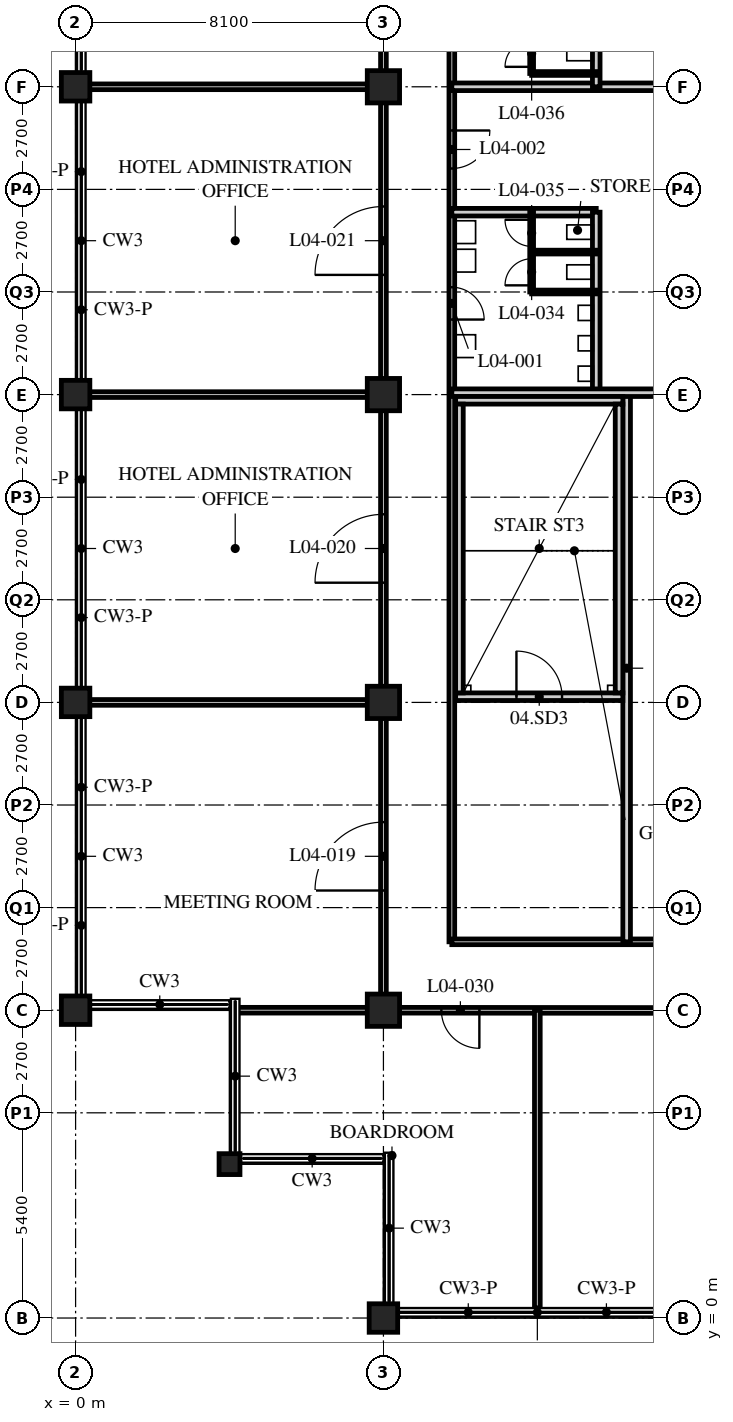
"""IFC4 building model, lengths in metres.
Left out: names, types, materials, properties, quantities, classifications, styles, units other than length and angle.
Written with IfcOpenShell. Run it as: python <this file> out.ifc"""

import sys

from ifc_helpers import new_model, si_unit, direction, frame, frame_2d, origin, origin_2d, place, context, subcontext, project, spatial, rectangle, hollow_rectangle, extrude, element, fill, save


model = new_model("IFC4")
c1 = context("Model", 3, precision=1e-05, world=origin(), true_north=direction((0.0, 1.0)))
c2 = subcontext(c1, "Body", "Model", "MODEL_VIEW")
j1 = project(units=[si_unit("LENGTHUNIT", "METRE"), si_unit("PLANEANGLEUNIT", "RADIAN")], contexts=[c1])
p1 = place(None, origin())
s1 = spatial("IfcSite", under=j1, at=p1, CompositionType="ELEMENT")
p2 = place(p1, origin())
s2 = spatial("IfcBuilding", under=s1, at=p2, CompositionType="ELEMENT")
p3 = place(p2, frame((0.0, 0.0, 22.2)))
s3 = spatial("IfcBuildingStorey", under=s2, at=p3, CompositionType="ELEMENT", Elevation=22.2)
for number, where, z_axis, x_axis in (
    (1, (0.0, 8.1, 0.0), (0.0, 0.0, 1.0), (1.0, 0.0, 0.0)),
    (2, (0.0, 16.2, 0.0), (0.0, 0.0, 1.0), (1.0, 0.0, 0.0)),
    (3, (0.0, 24.3, 0.0), (0.0, 0.0, 1.0), (1.0, 0.0, 0.0)),
    (4, (0.0, 32.4, 0.0), (0.0, 0.0, 1.0), (1.0, 0.0, 0.0)),
):
    element("IfcColumn", number, at=place(p3, frame(where, z_axis=z_axis, x_axis=x_axis)), inside=s3, PredefinedType="COLUMN", context=c2, shape_type="SweptSolid", body=[
        extrude(hollow_rectangle(XDim=0.75, YDim=0.75, WallThickness=0.07, at=origin_2d()), origin(), (0.0, 0.0, 1.0), 5.4),
    ])
p4 = place(p3, frame((4.05, 4.05, 0.0), z_axis=(0.0, 0.0, 1.0), x_axis=(1.0, 0.0, 0.0)))
e5 = element("IfcColumn", 5, at=p4, inside=s3, PredefinedType="COLUMN", context=c2, shape_type="SweptSolid", body=[
    extrude(hollow_rectangle(XDim=0.55, YDim=0.55, WallThickness=0.05, at=origin_2d()), origin(), (0.0, 0.0, 1.0), 5.4),
])
p5 = place(p3, frame((8.1, 0.0, 0.0), z_axis=(0.0, 0.0, 1.0), x_axis=(1.0, 0.0, 0.0)))
e6 = element("IfcColumn", 6, at=p5, inside=s3, PredefinedType="COLUMN", context=c2, shape_type="SweptSolid", body=[
    extrude(hollow_rectangle(XDim=0.75, YDim=0.75, WallThickness=0.07, at=origin_2d()), origin(), (0.0, 0.0, 1.0), 5.4),
])
for number, where, z_axis, x_axis in (
    (7, (8.1, 8.1, 0.0), (0.0, 0.0, 1.0), (1.0, 0.0, 0.0)),
    (8, (8.1, 16.2, 0.0), (0.0, 0.0, 1.0), (1.0, 0.0, 0.0)),
    (9, (8.1, 24.3, 0.0), (0.0, 0.0, 1.0), (1.0, 0.0, 0.0)),
    (10, (8.1, 32.4, 0.0), (0.0, 0.0, 1.0), (1.0, 0.0, 0.0)),
):
    element("IfcColumn", number, at=place(p3, frame(where, z_axis=z_axis, x_axis=x_axis)), inside=s3, PredefinedType="COLUMN", context=c2, shape_type="SweptSolid", body=[
        extrude(hollow_rectangle(XDim=0.85, YDim=0.85, WallThickness=0.085, at=origin_2d()), origin(), (0.0, 0.0, 1.0), 5.4),
    ])
p6 = place(p3, frame((8.1, 8.1, 0.0), z_axis=(0.0, 0.0, 1.0), x_axis=(0.99999962324, -0.000868055229, 0.0)))
e11 = element("IfcWall", 11, at=p6, inside=s3, PredefinedType="PARTITIONING", context=c2, shape_type="SweptSolid", body=[
    extrude(rectangle(XDim=40.5, YDim=0.15, at=frame_2d((20.25, 0.0))), origin(), (0.0, 0.0, 1.0), 4.428),
])
p7 = place(p6, frame((11.25, 0.0, 0.0)))
e12 = element("IfcOpeningElement", 12, at=p7, cuts=e11, PredefinedType="OPENING", context=c2, shape_type="SweptSolid", body=[
    extrude(rectangle(XDim=1.8, YDim=2.4, at=frame_2d((0.9, 1.2))), frame((0.0, 0.085, 0.0), z_axis=(0.0, -1.0, 0.0), x_axis=(1.0, 0.0, 0.0)), (0.0, 0.0, 1.0), 0.17),
])
p8 = place(p6, frame((25.15, 0.0, 0.0)))
e13 = element("IfcOpeningElement", 13, at=p8, cuts=e11, PredefinedType="OPENING", context=c2, shape_type="SweptSolid", body=[
    extrude(rectangle(XDim=1.8, YDim=2.4, at=frame_2d((0.9, 1.2))), frame((0.0, 0.085, 0.0), z_axis=(0.0, -1.0, 0.0), x_axis=(1.0, 0.0, 0.0)), (0.0, 0.0, 1.0), 0.17),
])
p9 = place(p6, frame((33.25, 0.0, 0.0)))
e14 = element("IfcOpeningElement", 14, at=p9, cuts=e11, PredefinedType="OPENING", context=c2, shape_type="SweptSolid", body=[
    extrude(rectangle(XDim=1.8, YDim=2.4, at=frame_2d((0.9, 1.2))), frame((0.0, 0.085, 0.0), z_axis=(0.0, -1.0, 0.0), x_axis=(1.0, 0.0, 0.0)), (0.0, 0.0, 1.0), 0.17),
])
p10 = place(p6, frame((1.525, 0.0, 0.0)))
e15 = element("IfcOpeningElement", 15, at=p10, cuts=e11, PredefinedType="OPENING", context=c2, shape_type="SweptSolid", body=[
    extrude(rectangle(XDim=1.0, YDim=2.1, at=frame_2d((0.5, 1.05))), frame((0.0, 0.085, 0.0), z_axis=(0.0, -1.0, 0.0), x_axis=(1.0, 0.0, 0.0)), (0.0, 0.0, 1.0), 0.17),
])
p11 = place(p6, frame((37.975, 0.0, 0.0)))
e16 = element("IfcOpeningElement", 16, at=p11, cuts=e11, PredefinedType="OPENING", context=c2, shape_type="SweptSolid", body=[
    extrude(rectangle(XDim=1.0, YDim=2.1, at=frame_2d((0.5, 1.05))), frame((0.0, 0.085, 0.0), z_axis=(0.0, -1.0, 0.0), x_axis=(1.0, 0.0, 0.0)), (0.0, 0.0, 1.0), 0.17),
])
p12 = place(p3, frame((8.1, 8.1, 0.0), z_axis=(0.0, 0.0, 1.0), x_axis=(0.0, 1.0, 0.0)))
e17 = element("IfcWall", 17, at=p12, inside=s3, PredefinedType="PARTITIONING", context=c2, shape_type="SweptSolid", body=[
    extrude(rectangle(XDim=34.35, YDim=0.15, at=frame_2d((17.175, 0.0))), origin(), (0.0, 0.0, 1.0), 4.428),
])
p13 = place(p12, frame((3.15, 0.0, 0.0)))
e18 = element("IfcOpeningElement", 18, at=p13, cuts=e17, PredefinedType="OPENING", context=c2, shape_type="SweptSolid", body=[
    extrude(rectangle(XDim=1.8, YDim=2.4, at=frame_2d((0.9, 1.2))), frame((0.0, 0.085, 0.0), z_axis=(0.0, -1.0, 0.0), x_axis=(1.0, 0.0, 0.0)), (0.0, 0.0, 1.0), 0.17),
])
p14 = place(p12, frame((11.25, 0.0, 0.0)))
e19 = element("IfcOpeningElement", 19, at=p14, cuts=e17, PredefinedType="OPENING", context=c2, shape_type="SweptSolid", body=[
    extrude(rectangle(XDim=1.8, YDim=2.4, at=frame_2d((0.9, 1.2))), frame((0.0, 0.085, 0.0), z_axis=(0.0, -1.0, 0.0), x_axis=(1.0, 0.0, 0.0)), (0.0, 0.0, 1.0), 0.17),
])
p15 = place(p12, frame((19.35, 0.0, 0.0)))
e20 = element("IfcOpeningElement", 20, at=p15, cuts=e17, PredefinedType="OPENING", context=c2, shape_type="SweptSolid", body=[
    extrude(rectangle(XDim=1.8, YDim=2.4, at=frame_2d((0.9, 1.2))), frame((0.0, 0.085, 0.0), z_axis=(0.0, -1.0, 0.0), x_axis=(1.0, 0.0, 0.0)), (0.0, 0.0, 1.0), 0.17),
])
p16 = place(p12, frame((28.425, 0.0, 0.0)))
e21 = element("IfcOpeningElement", 21, at=p16, cuts=e17, PredefinedType="OPENING", context=c2, shape_type="SweptSolid", body=[
    extrude(rectangle(XDim=1.8, YDim=2.4, at=frame_2d((0.9, 1.2))), frame((0.0, 0.085, 0.0), z_axis=(0.0, -1.0, 0.0), x_axis=(1.0, 0.0, 0.0)), (0.0, 0.0, 1.0), 0.17),
])
p17 = place(p3, frame((9.9, 40.65, 0.0), z_axis=(0.0, 0.0, 1.0), x_axis=(0.0, -1.0, 0.0)))
e22 = element("IfcWall", 22, at=p17, inside=s3, PredefinedType="PARTITIONING", context=c2, shape_type="SweptSolid", body=[
    extrude(rectangle(XDim=30.75, YDim=0.15, at=frame_2d((15.375, 0.0))), origin(), (0.0, 0.0, 1.0), 5.19),
])
p18 = place(p17, frame((13.525, 0.0, 0.0)))
e23 = element("IfcOpeningElement", 23, at=p18, cuts=e22, PredefinedType="OPENING", context=c2, shape_type="SweptSolid", body=[
    extrude(rectangle(XDim=0.85, YDim=2.1, at=frame_2d((0.425, 1.05))), frame((0.0, 0.085, 0.0), z_axis=(0.0, -1.0, 0.0), x_axis=(1.0, 0.0, 0.0)), (0.0, 0.0, 1.0), 0.17),
])
p19 = place(p17, frame((9.4, 0.0, 0.0)))
e24 = element("IfcOpeningElement", 24, at=p19, cuts=e22, PredefinedType="OPENING", context=c2, shape_type="SweptSolid", body=[
    extrude(rectangle(XDim=1.0, YDim=2.1, at=frame_2d((0.5, 1.05))), frame((0.0, 0.085, 0.0), z_axis=(0.0, -1.0, 0.0), x_axis=(1.0, 0.0, 0.0)), (0.0, 0.0, 1.0), 0.17),
])
p20 = place(p17, frame((5.025, 0.0, 0.0)))
e25 = element("IfcOpeningElement", 25, at=p20, cuts=e22, PredefinedType="OPENING", context=c2, shape_type="SweptSolid", body=[
    extrude(rectangle(XDim=0.85, YDim=2.1, at=frame_2d((0.425, 1.05))), frame((0.0, 0.085, 0.0), z_axis=(0.0, -1.0, 0.0), x_axis=(1.0, 0.0, 0.0)), (0.0, 0.0, 1.0), 0.17),
])
p21 = place(p17, frame((0.9, 0.0, 0.0)))
e26 = element("IfcOpeningElement", 26, at=p21, cuts=e22, PredefinedType="OPENING", context=c2, shape_type="SweptSolid", body=[
    extrude(rectangle(XDim=1.0, YDim=2.1, at=frame_2d((0.5, 1.05))), frame((0.0, 0.085, 0.0), z_axis=(0.0, -1.0, 0.0), x_axis=(1.0, 0.0, 0.0)), (0.0, 0.0, 1.0), 0.17),
])
p22 = place(p3, frame((9.9, 9.9, 0.0), z_axis=(0.0, 0.0, 1.0), x_axis=(1.0, 0.0, 0.0)))
e27 = element("IfcWall", 27, at=p22, inside=s3, PredefinedType="PARTITIONING", context=c2, shape_type="SweptSolid", body=[
    extrude(rectangle(XDim=17.24, YDim=0.15, at=frame_2d((8.62, 0.0))), origin(), (0.0, 0.0, 1.0), 5.19),
])
p23 = place(p22, frame((10.425, 0.0, 0.0)))
e28 = element("IfcOpeningElement", 28, at=p23, cuts=e27, PredefinedType="OPENING", context=c2, shape_type="SweptSolid", body=[
    extrude(rectangle(XDim=1.0, YDim=2.1, at=frame_2d((0.5, 1.05))), frame((0.0, 0.085, 0.0), z_axis=(0.0, -1.0, 0.0), x_axis=(1.0, 0.0, 0.0)), (0.0, 0.0, 1.0), 0.17),
])
p24 = place(p3, frame((9.9, 32.4, 0.0), z_axis=(0.0, 0.0, 1.0), x_axis=(1.0, 0.0, 0.0)))
e29 = element("IfcWall", 29, at=p24, inside=s3, PredefinedType="SOLIDWALL", context=c2, shape_type="SweptSolid", body=[
    extrude(rectangle(XDim=6.3, YDim=0.2, at=frame_2d((3.15, 0.0))), origin(), (0.0, 0.0, 1.0), 4.428),
])
p25 = place(p3, frame((9.9, 29.1, 0.0), z_axis=(0.0, 0.0, 1.0), x_axis=(1.0, 0.0, 0.0)))
e30 = element("IfcWall", 30, at=p25, inside=s3, PredefinedType="SOLIDWALL", context=c2, shape_type="SweptSolid", body=[
    extrude(rectangle(XDim=3.8, YDim=0.2, at=frame_2d((1.9, 0.0))), origin(), (0.0, 0.0, 1.0), 5.19),
])
p26 = place(p3, frame((13.7, 24.3, 0.0), z_axis=(0.0, 0.0, 1.0), x_axis=(0.0, 1.0, 0.0)))
e31 = element("IfcWall", 31, at=p26, inside=s3, PredefinedType="SOLIDWALL", context=c2, shape_type="SweptSolid", body=[
    extrude(rectangle(XDim=4.8, YDim=0.2, at=frame_2d((2.4, 0.0))), origin(), (0.0, 0.0, 1.0), 5.19),
])
p27 = place(p3, frame((13.7, 32.4, 0.0), z_axis=(0.0, 0.0, 1.0), x_axis=(0.0, 1.0, 0.0)))
e32 = element("IfcWall", 32, at=p27, inside=s3, PredefinedType="SOLIDWALL", context=c2, shape_type="SweptSolid", body=[
    extrude(rectangle(XDim=5.6, YDim=0.2, at=frame_2d((2.8, 0.0))), origin(), (0.0, 0.0, 1.0), 5.19),
])
p28 = place(p3, frame((14.5, 9.9, 0.0), z_axis=(0.0, 0.0, 1.0), x_axis=(0.0, 1.0, 0.0)))
e33 = element("IfcWall", 33, at=p28, inside=s3, PredefinedType="SOLIDWALL", context=c2, shape_type="SweptSolid", body=[
    extrude(rectangle(XDim=14.4, YDim=0.2, at=frame_2d((7.2, 0.0))), origin(), (0.0, 0.0, 1.0), 5.19),
])
p29 = place(p3, frame((9.9, 24.35, 0.0), z_axis=(0.0, 0.0, 1.0), x_axis=(1.0, 0.0, 0.0)))
e34 = element("IfcWall", 34, at=p29, inside=s3, PredefinedType="SOLIDWALL", context=c2, shape_type="SweptSolid", body=[
    extrude(rectangle(XDim=6.3, YDim=0.2, at=frame_2d((3.15, 0.0))), origin(), (0.0, 0.0, 1.0), 4.428),
])
for number, where, z_axis, x_axis in (
    (35, (8.1, 16.2, 0.0), (0.0, 0.0, 1.0), (-1.0, 0.0, 0.0)),
    (36, (8.1, 24.3, 0.0), (0.0, 0.0, 1.0), (-1.0, 0.0, 0.0)),
    (37, (8.1, 32.4, 0.0), (0.0, 0.0, 1.0), (-1.0, 0.0, 0.0)),
):
    element("IfcWall", number, at=place(p3, frame(where, z_axis=z_axis, x_axis=x_axis)), inside=s3, PredefinedType="PARTITIONING", context=c2, shape_type="SweptSolid", body=[
        extrude(rectangle(XDim=7.8, YDim=0.15, at=frame_2d((3.9, 0.0))), origin(), (0.0, 0.0, 1.0), 4.428),
    ])
p30 = place(p3, frame((4.22, 8.1, 0.0), z_axis=(0.0, 0.0, 1.0), x_axis=(1.0, 0.0, 0.0)))
e38 = element("IfcWall", 38, at=p30, inside=s3, PredefinedType="PARTITIONING", context=c2, shape_type="SweptSolid", body=[
    extrude(rectangle(XDim=3.88, YDim=0.15, at=frame_2d((1.94, 0.0))), origin(), (0.0, 0.0, 1.0), 4.428),
])
p31 = place(p3, frame((12.15, 8.1, 0.0), z_axis=(0.0, 0.0, 1.0), x_axis=(0.0, -1.0, 0.0)))
e39 = element("IfcWall", 39, at=p31, inside=s3, PredefinedType="PARTITIONING", context=c2, shape_type="SweptSolid", body=[
    extrude(rectangle(XDim=7.835, YDim=0.15, at=frame_2d((3.917, 0.0))), origin(), (0.0, 0.0, 1.0), 5.19),
])
p32 = place(p3, frame((12.0, 27.0, 0.0), z_axis=(0.0, 0.0, 1.0), x_axis=(0.0, 1.0, 0.0)))
e40 = element("IfcWall", 40, at=p32, inside=s3, PredefinedType="PARTITIONING", context=c2, shape_type="SweptSolid", body=[
    extrude(rectangle(XDim=2.1, YDim=0.1, at=frame_2d((1.05, 0.0))), origin(), (0.0, 0.0, 1.0), 5.19),
])
p33 = place(p32, frame((0.175, 0.0, 0.0)))
e41 = element("IfcOpeningElement", 41, at=p33, cuts=e40, PredefinedType="OPENING", context=c2, shape_type="SweptSolid", body=[
    extrude(rectangle(XDim=0.7, YDim=2.0, at=frame_2d((0.35, 1.0))), frame((0.0, 0.06, 0.0), z_axis=(0.0, -1.0, 0.0), x_axis=(1.0, 0.0, 0.0)), (0.0, 0.0, 1.0), 0.12),
])
p34 = place(p32, frame((1.2, 0.0, 0.0)))
e42 = element("IfcOpeningElement", 42, at=p34, cuts=e40, PredefinedType="OPENING", context=c2, shape_type="SweptSolid", body=[
    extrude(rectangle(XDim=0.7, YDim=2.0, at=frame_2d((0.35, 1.0))), frame((0.0, 0.06, 0.0), z_axis=(0.0, -1.0, 0.0), x_axis=(1.0, 0.0, 0.0)), (0.0, 0.0, 1.0), 0.12),
])
for number, where, z_axis, x_axis in (
    (43, (12.0, 27.0, 0.0), (0.0, 0.0, 1.0), (1.0, 0.0, 0.0)),
    (44, (12.0, 28.05, 0.0), (0.0, 0.0, 1.0), (1.0, 0.0, 0.0)),
):
    element("IfcWall", number, at=place(p3, frame(where, z_axis=z_axis, x_axis=x_axis)), inside=s3, PredefinedType="PARTITIONING", context=c2, shape_type="SweptSolid", body=[
        extrude(rectangle(XDim=1.7, YDim=0.1, at=frame_2d((0.85, 0.0))), origin(), (0.0, 0.0, 1.0), 5.19),
    ])
p35 = place(p3, frame((12.0, 32.75, 0.0), z_axis=(0.0, 0.0, 1.0), x_axis=(0.0, 1.0, 0.0)))
e45 = element("IfcWall", 45, at=p35, inside=s3, PredefinedType="PARTITIONING", context=c2, shape_type="SweptSolid", body=[
    extrude(rectangle(XDim=5.25, YDim=0.1, at=frame_2d((2.625, 0.0))), origin(), (0.0, 0.0, 1.0), 5.19),
])
p36 = place(p35, frame((0.175, 0.0, 0.0)))
e46 = element("IfcOpeningElement", 46, at=p36, cuts=e45, PredefinedType="OPENING", context=c2, shape_type="SweptSolid", body=[
    extrude(rectangle(XDim=0.7, YDim=2.0, at=frame_2d((0.35, 1.0))), frame((0.0, 0.06, 0.0), z_axis=(0.0, -1.0, 0.0), x_axis=(1.0, 0.0, 0.0)), (0.0, 0.0, 1.0), 0.12),
])
p37 = place(p35, frame((1.225, 0.0, 0.0)))
e47 = element("IfcOpeningElement", 47, at=p37, cuts=e45, PredefinedType="OPENING", context=c2, shape_type="SweptSolid", body=[
    extrude(rectangle(XDim=0.7, YDim=2.0, at=frame_2d((0.35, 1.0))), frame((0.0, 0.06, 0.0), z_axis=(0.0, -1.0, 0.0), x_axis=(1.0, 0.0, 0.0)), (0.0, 0.0, 1.0), 0.12),
])
p38 = place(p35, frame((2.275, 0.0, 0.0)))
e48 = element("IfcOpeningElement", 48, at=p38, cuts=e45, PredefinedType="OPENING", context=c2, shape_type="SweptSolid", body=[
    extrude(rectangle(XDim=0.7, YDim=2.0, at=frame_2d((0.35, 1.0))), frame((0.0, 0.06, 0.0), z_axis=(0.0, -1.0, 0.0), x_axis=(1.0, 0.0, 0.0)), (0.0, 0.0, 1.0), 0.12),
])
p39 = place(p35, frame((3.325, 0.0, 0.0)))
e49 = element("IfcOpeningElement", 49, at=p39, cuts=e45, PredefinedType="OPENING", context=c2, shape_type="SweptSolid", body=[
    extrude(rectangle(XDim=0.7, YDim=2.0, at=frame_2d((0.35, 1.0))), frame((0.0, 0.06, 0.0), z_axis=(0.0, -1.0, 0.0), x_axis=(1.0, 0.0, 0.0)), (0.0, 0.0, 1.0), 0.12),
])
p40 = place(p35, frame((4.35, 0.0, 0.0)))
e50 = element("IfcOpeningElement", 50, at=p40, cuts=e45, PredefinedType="OPENING", context=c2, shape_type="SweptSolid", body=[
    extrude(rectangle(XDim=0.7, YDim=2.0, at=frame_2d((0.35, 1.0))), frame((0.0, 0.06, 0.0), z_axis=(0.0, -1.0, 0.0), x_axis=(1.0, 0.0, 0.0)), (0.0, 0.0, 1.0), 0.12),
])
p41 = place(p3, frame((12.0, 32.75, 0.0), z_axis=(0.0, 0.0, 1.0), x_axis=(1.0, 0.0, 0.0)))
e51 = element("IfcWall", 51, at=p41, inside=s3, PredefinedType="PARTITIONING", context=c2, shape_type="SweptSolid", body=[
    extrude(rectangle(XDim=1.7, YDim=0.1, at=frame_2d((0.85, 0.0))), origin(), (0.0, 0.0, 1.0), 5.19),
])
p42 = place(p3, frame((10.0, 16.35, 0.0), z_axis=(0.0, 0.0, 1.0), x_axis=(1.0, 0.0, 0.0)))
e52 = element("IfcWall", 52, at=p42, inside=s3, PredefinedType="SOLIDWALL", context=c2, shape_type="SweptSolid", body=[
    extrude(rectangle(XDim=4.4, YDim=0.2, at=frame_2d((2.2, 0.0))), origin(), (0.0, 0.0, 1.0), 4.428),
])
p43 = place(p42, frame((1.6, 0.0, 0.0)))
e53 = element("IfcOpeningElement", 53, at=p43, cuts=e52, PredefinedType="OPENING", context=c2, shape_type="SweptSolid", body=[
    extrude(rectangle(XDim=1.2, YDim=2.1, at=frame_2d((0.6, 1.05))), frame((0.0, 0.11, 0.0), z_axis=(0.0, -1.0, 0.0), x_axis=(1.0, 0.0, 0.0)), (0.0, 0.0, 1.0), 0.22),
])
p44 = place(p3, frame((10.0, 24.15, 0.0), z_axis=(0.0, 0.0, 1.0), x_axis=(1.0, 0.0, 0.0)))
e54 = element("IfcWall", 54, at=p44, inside=s3, PredefinedType="SOLIDWALL", context=c2, shape_type="SweptSolid", body=[
    extrude(rectangle(XDim=4.4, YDim=0.2, at=frame_2d((2.2, 0.0))), origin(), (0.0, 0.0, 1.0), 4.428),
])
for number, where, z_axis, x_axis in (
    (55, (10.1, 16.45, 0.0), (0.0, 0.0, 1.0), (0.0, 1.0, 0.0)),
    (56, (14.3, 16.45, 0.0), (0.0, 0.0, 1.0), (0.0, 1.0, 0.0)),
):
    element("IfcWall", number, at=place(p3, frame(where, z_axis=z_axis, x_axis=x_axis)), inside=s3, PredefinedType="SOLIDWALL", context=c2, shape_type="SweptSolid", body=[
        extrude(rectangle(XDim=7.6, YDim=0.2, at=frame_2d((3.8, 0.0))), origin(), (0.0, 0.0, 1.0), 5.19),
    ])
p45 = place(p18, origin())
e57 = element("IfcDoor", 57, at=p45, inside=s3, OperationType="SINGLE_SWING_RIGHT", PredefinedType="DOOR", context=c2, shape_type="SweptSolid", body=[
    extrude(rectangle(XDim=0.85, YDim=2.1, at=frame_2d((0.425, 1.05))), frame((0.0, 0.025, 0.0), z_axis=(0.0, -1.0, 0.0), x_axis=(1.0, 0.0, 0.0)), (0.0, 0.0, 1.0), 0.05),
])
fill(e23, e57)
p46 = place(p19, origin())
e58 = element("IfcDoor", 58, at=p46, inside=s3, OperationType="SINGLE_SWING_LEFT", PredefinedType="DOOR", context=c2, shape_type="SweptSolid", body=[
    extrude(rectangle(XDim=1.0, YDim=2.1, at=frame_2d((0.5, 1.05))), frame((0.0, 0.025, 0.0), z_axis=(0.0, -1.0, 0.0), x_axis=(1.0, 0.0, 0.0)), (0.0, 0.0, 1.0), 0.05),
])
fill(e24, e58)
p47 = place(p13, origin())
e59 = element("IfcDoor", 59, at=p47, inside=s3, OperationType="DOUBLE_DOOR_SINGLE_SWING", PredefinedType="DOOR", context=c2, shape_type="SweptSolid", body=[
    extrude(rectangle(XDim=1.8, YDim=2.4, at=frame_2d((0.9, 1.2))), frame((0.0, 0.025, 0.0), z_axis=(0.0, -1.0, 0.0), x_axis=(1.0, 0.0, 0.0)), (0.0, 0.0, 1.0), 0.05),
])
fill(e18, e59)
p48 = place(p14, origin())
e60 = element("IfcDoor", 60, at=p48, inside=s3, OperationType="DOUBLE_DOOR_SINGLE_SWING", PredefinedType="DOOR", context=c2, shape_type="SweptSolid", body=[
    extrude(rectangle(XDim=1.8, YDim=2.4, at=frame_2d((0.9, 1.2))), frame((0.0, 0.025, 0.0), z_axis=(0.0, -1.0, 0.0), x_axis=(1.0, 0.0, 0.0)), (0.0, 0.0, 1.0), 0.05),
])
fill(e19, e60)
p49 = place(p15, origin())
e61 = element("IfcDoor", 61, at=p49, inside=s3, OperationType="DOUBLE_DOOR_SINGLE_SWING", PredefinedType="DOOR", context=c2, shape_type="SweptSolid", body=[
    extrude(rectangle(XDim=1.8, YDim=2.4, at=frame_2d((0.9, 1.2))), frame((0.0, 0.025, 0.0), z_axis=(0.0, -1.0, 0.0), x_axis=(1.0, 0.0, 0.0)), (0.0, 0.0, 1.0), 0.05),
])
fill(e20, e61)
p50 = place(p10, origin())
e62 = element("IfcDoor", 62, at=p50, inside=s3, OperationType="SINGLE_SWING_LEFT", PredefinedType="DOOR", context=c2, shape_type="SweptSolid", body=[
    extrude(rectangle(XDim=1.0, YDim=2.1, at=frame_2d((0.5, 1.05))), frame((0.0, 0.025, 0.0), z_axis=(0.0, -1.0, 0.0), x_axis=(1.0, 0.0, 0.0)), (0.0, 0.0, 1.0), 0.05),
])
fill(e15, e62)
p51 = place(p33, origin())
e63 = element("IfcDoor", 63, at=p51, inside=s3, OperationType="SINGLE_SWING_LEFT", PredefinedType="DOOR", context=c2, shape_type="SweptSolid", body=[
    extrude(rectangle(XDim=0.7, YDim=2.0, at=frame_2d((0.35, 1.0))), frame((0.0, 0.025, 0.0), z_axis=(0.0, -1.0, 0.0), x_axis=(1.0, 0.0, 0.0)), (0.0, 0.0, 1.0), 0.05),
])
fill(e41, e63)
p52 = place(p34, origin())
e64 = element("IfcDoor", 64, at=p52, inside=s3, OperationType="SINGLE_SWING_RIGHT", PredefinedType="DOOR", context=c2, shape_type="SweptSolid", body=[
    extrude(rectangle(XDim=0.7, YDim=2.0, at=frame_2d((0.35, 1.0))), frame((0.0, 0.025, 0.0), z_axis=(0.0, -1.0, 0.0), x_axis=(1.0, 0.0, 0.0)), (0.0, 0.0, 1.0), 0.05),
])
fill(e42, e64)
p53 = place(p36, origin())
e65 = element("IfcDoor", 65, at=p53, inside=s3, OperationType="SINGLE_SWING_LEFT", PredefinedType="DOOR", context=c2, shape_type="SweptSolid", body=[
    extrude(rectangle(XDim=0.7, YDim=2.0, at=frame_2d((0.35, 1.0))), frame((0.0, 0.025, 0.0), z_axis=(0.0, -1.0, 0.0), x_axis=(1.0, 0.0, 0.0)), (0.0, 0.0, 1.0), 0.05),
])
fill(e46, e65)
p54 = place(p43, origin())
e66 = element("IfcDoor", 66, at=p54, inside=s3, OperationType="SINGLE_SWING_LEFT", PredefinedType="DOOR", context=c2, shape_type="SweptSolid", body=[
    extrude(rectangle(XDim=1.2, YDim=2.1, at=frame_2d((0.6, 1.05))), frame((0.0, 0.025, 0.0), z_axis=(0.0, -1.0, 0.0), x_axis=(1.0, 0.0, 0.0)), (0.0, 0.0, 1.0), 0.05),
])
fill(e53, e66)
save(model, sys.argv[1])
